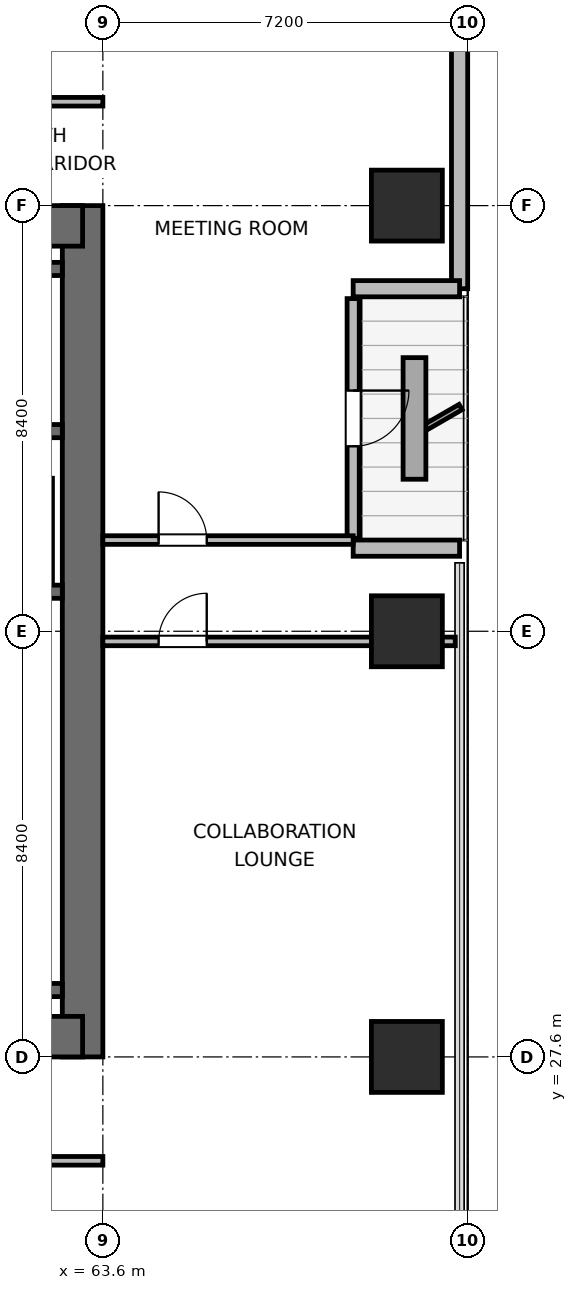
"""IFC4 building model, lengths in metres.
Left out: names, types, materials, properties, quantities, classifications, styles, units other than length and angle.
Written with IfcOpenShell. Run it as: python <this file> out.ifc"""

import sys

from ifc_helpers import new_model, si_unit, direction, frame, frame_2d, origin, origin_2d, place, context, subcontext, project, spatial, rectangle, extrude, element, fill, save


model = new_model("IFC4")
c1 = context("Model", 3, precision=1e-05, world=origin(), true_north=direction((0.0, 1.0)))
c2 = subcontext(c1, "Body", "Model", "MODEL_VIEW")
j1 = project(units=[si_unit("LENGTHUNIT", "METRE"), si_unit("PLANEANGLEUNIT", "RADIAN")], contexts=[c1])
p1 = place(None, origin())
s1 = spatial("IfcSite", under=j1, at=p1, CompositionType="ELEMENT")
p2 = place(p1, origin())
s2 = spatial("IfcBuilding", under=s1, at=p2, CompositionType="ELEMENT")
p3 = place(p2, frame((0.0, 0.0, 141.6)))
s3 = spatial("IfcBuildingStorey", under=s2, at=p3, CompositionType="ELEMENT", Elevation=141.6)
p4 = place(p3, frame((63.2, 27.6, 0.0), z_axis=(0.0, 0.0, 1.0), x_axis=(0.0, 1.0, 0.0)))
e1 = element("IfcWall", 1, at=p4, inside=s3, PredefinedType="SHEAR", context=c2, shape_type="SweptSolid", body=[
    extrude(rectangle(XDim=16.8, YDim=0.8, at=frame_2d((8.4, 0.0))), origin(), (0.0, 0.0, 1.0), 3.9),
])
p5 = place(p3, frame((54.0, 28.0, 0.0), z_axis=(0.0, 0.0, 1.0), x_axis=(1.0, 0.0, 0.0)))
e2 = element("IfcWall", 2, at=p5, inside=s3, PredefinedType="SHEAR", context=c2, shape_type="SweptSolid", body=[
    extrude(rectangle(XDim=9.2, YDim=0.8, at=frame_2d((4.6, 0.0))), origin(), (0.0, 0.0, 1.0), 3.9),
])
p6 = place(p5, frame((3.925, 0.0, 0.0)))
e3 = element("IfcOpeningElement", 3, at=p6, cuts=e2, PredefinedType="OPENING", context=c2, shape_type="SweptSolid", body=[
    extrude(rectangle(XDim=1.05, YDim=2.04, at=frame_2d((0.525, 1.02))), frame((0.0, 0.41, 0.0), z_axis=(0.0, -1.0, 0.0), x_axis=(1.0, 0.0, 0.0)), (0.0, 0.0, 1.0), 0.82),
])
p7 = place(p3, frame((54.0, 44.0, 0.0), z_axis=(0.0, 0.0, 1.0), x_axis=(1.0, 0.0, 0.0)))
e4 = element("IfcWall", 4, at=p7, inside=s3, PredefinedType="SHEAR", context=c2, shape_type="SweptSolid", body=[
    extrude(rectangle(XDim=9.2, YDim=0.8, at=frame_2d((4.6, 0.0))), origin(), (0.0, 0.0, 1.0), 3.9),
])
for number, where, z_axis, x_axis in (
    (5, (58.89, 28.92, 0.0), (0.0, 0.0, 1.0), (1.0, 0.0, 0.0)),
    (6, (58.89, 36.78, 0.0), (0.0, 0.0, 1.0), (1.0, 0.0, 0.0)),
):
    element("IfcWall", number, at=place(p3, frame(where, z_axis=z_axis, x_axis=x_axis)), inside=s3, PredefinedType="SHEAR", context=c2, shape_type="SweptSolid", body=[
        extrude(rectangle(XDim=3.91, YDim=0.26, at=frame_2d((1.955, 0.0))), origin(), (0.0, 0.0, 1.0), 3.9),
    ])
p8 = place(p3, frame((54.4, 39.95, 0.0), z_axis=(0.0, 0.0, 1.0), x_axis=(1.0, 0.0, 0.0)))
e7 = element("IfcWall", 7, at=p8, inside=s3, PredefinedType="SHEAR", context=c2, shape_type="SweptSolid", body=[
    extrude(rectangle(XDim=8.4, YDim=0.26, at=frame_2d((4.2, 0.0))), origin(), (0.0, 0.0, 1.0), 3.9),
])
p9 = place(p8, frame((0.8, 0.0, 0.0)))
e8 = element("IfcOpeningElement", 8, at=p9, cuts=e7, PredefinedType="OPENING", context=c2, shape_type="SweptSolid", body=[
    extrude(rectangle(XDim=1.0, YDim=2.04, at=frame_2d((0.5, 1.02))), frame((0.0, 0.14, 0.0), z_axis=(0.0, -1.0, 0.0), x_axis=(1.0, 0.0, 0.0)), (0.0, 0.0, 1.0), 0.28),
])
p10 = place(p3, frame((54.4, 43.15, 0.0), z_axis=(0.0, 0.0, 1.0), x_axis=(1.0, 0.0, 0.0)))
e9 = element("IfcWall", 9, at=p10, inside=s3, PredefinedType="SHEAR", context=c2, shape_type="SweptSolid", body=[
    extrude(rectangle(XDim=8.4, YDim=0.26, at=frame_2d((4.2, 0.0))), origin(), (0.0, 0.0, 1.0), 3.9),
])
for number, where, z_axis, x_axis in (
    (10, (69.6, 27.6, 0.0), (0.0, 0.0, 1.0), (1.0, 0.0, 0.0)),
    (11, (69.6, 36.0, 0.0), (0.0, 0.0, 1.0), (1.0, 0.0, 0.0)),
    (12, (69.6, 44.4, 0.0), (0.0, 0.0, 1.0), (1.0, 0.0, 0.0)),
):
    element("IfcColumn", number, at=place(p3, frame(where, z_axis=z_axis, x_axis=x_axis)), inside=s3, PredefinedType="COLUMN", context=c2, shape_type="SweptSolid", body=[
        extrude(rectangle(XDim=1.4, YDim=1.4, at=origin_2d()), origin(), (0.0, 0.0, 1.0), 3.9),
    ])
p11 = place(p3, frame((70.64, 56.979, 0.0), z_axis=(0.0, 0.0, 1.0), x_axis=(0.0, -1.0, 0.0)))
e13 = element("IfcWall", 13, at=p11, inside=s3, PredefinedType="SOLIDWALL", context=c2, shape_type="SweptSolid", body=[
    extrude(rectangle(XDim=14.219, YDim=0.32, at=frame_2d((7.109, 0.0))), origin(), (0.0, 0.0, 1.0), 3.6),
])
p12 = place(p3, frame((70.64, 42.76, 0.0), z_axis=(0.0, 0.0, 1.0), x_axis=(-1.0, 0.0, 0.0)))
e14 = element("IfcWall", 14, at=p12, inside=s3, PredefinedType="SOLIDWALL", context=c2, shape_type="SweptSolid", body=[
    extrude(rectangle(XDim=2.1, YDim=0.32, at=frame_2d((1.05, 0.0))), origin(), (0.0, 0.0, 1.0), 2.185),
])
p13 = place(p3, frame((68.54, 42.565, 0.0), z_axis=(0.0, 0.0, 1.0), x_axis=(0.0, -1.0, 0.0)))
e15 = element("IfcWall", 15, at=p13, inside=s3, PredefinedType="SOLIDWALL", context=c2, shape_type="SweptSolid", body=[
    extrude(rectangle(XDim=4.73, YDim=0.24, at=frame_2d((2.365, 0.0))), origin(), (0.0, 0.0, 1.0), 3.122),
])
p14 = place(p13, frame((1.815, 0.0, 0.0)))
e16 = element("IfcOpeningElement", 16, at=p14, cuts=e15, PredefinedType="OPENING", context=c2, shape_type="SweptSolid", body=[
    extrude(rectangle(XDim=1.1, YDim=2.04, at=frame_2d((0.55, 1.02))), frame((0.0, 0.13, 0.0), z_axis=(0.0, -1.0, 0.0), x_axis=(1.0, 0.0, 0.0)), (0.0, 0.0, 1.0), 0.26),
])
p15 = place(p3, frame((68.54, 37.64, 0.0), z_axis=(0.0, 0.0, 1.0), x_axis=(1.0, 0.0, 0.0)))
e17 = element("IfcWall", 17, at=p15, inside=s3, PredefinedType="SOLIDWALL", context=c2, shape_type="SweptSolid", body=[
    extrude(rectangle(XDim=2.1, YDim=0.32, at=frame_2d((1.05, 0.0))), origin(), (0.0, 0.0, 1.0), 2.185),
])
p16 = place(p3, frame((62.5, 36.98, 0.0), z_axis=(0.0, 0.0, 1.0), x_axis=(0.0, 1.0, 0.0)))
e18 = element("IfcWall", 18, at=p16, inside=s3, PredefinedType="PARTITIONING", context=c2, shape_type="SweptSolid", body=[
    extrude(rectangle(XDim=2.04, YDim=0.21, at=frame_2d((1.02, 0.0))), origin(), (0.0, 0.0, 1.0), 3.6),
])
p17 = place(p3, frame((30.35, 25.55, 0.0), z_axis=(0.0, 0.0, 1.0), x_axis=(1.0, 0.0, 0.0)))
e19 = element("IfcWall", 19, at=p17, inside=s3, PredefinedType="PARTITIONING", context=c2, shape_type="SweptSolid", body=[
    extrude(rectangle(XDim=33.25, YDim=0.17, at=frame_2d((16.625, 0.0))), origin(), (0.0, 0.0, 1.0), 3.6),
])
p18 = place(p17, frame((3.21, 0.0, 0.0)))
e20 = element("IfcOpeningElement", 20, at=p18, cuts=e19, PredefinedType="OPENING", context=c2, shape_type="SweptSolid", body=[
    extrude(rectangle(XDim=0.95, YDim=2.04, at=frame_2d((0.475, 1.02))), frame((0.0, 0.095, 0.0), z_axis=(0.0, -1.0, 0.0), x_axis=(1.0, 0.0, 0.0)), (0.0, 0.0, 1.0), 0.19),
])
p19 = place(p17, frame((9.98, 0.0, 0.0)))
e21 = element("IfcOpeningElement", 21, at=p19, cuts=e19, PredefinedType="OPENING", context=c2, shape_type="SweptSolid", body=[
    extrude(rectangle(XDim=0.95, YDim=2.04, at=frame_2d((0.475, 1.02))), frame((0.0, 0.095, 0.0), z_axis=(0.0, -1.0, 0.0), x_axis=(1.0, 0.0, 0.0)), (0.0, 0.0, 1.0), 0.19),
])
p20 = place(p17, frame((16.15, 0.0, 0.0)))
e22 = element("IfcOpeningElement", 22, at=p20, cuts=e19, PredefinedType="OPENING", context=c2, shape_type="SweptSolid", body=[
    extrude(rectangle(XDim=0.95, YDim=2.04, at=frame_2d((0.475, 1.02))), frame((0.0, 0.095, 0.0), z_axis=(0.0, -1.0, 0.0), x_axis=(1.0, 0.0, 0.0)), (0.0, 0.0, 1.0), 0.19),
])
p21 = place(p17, frame((22.32, 0.0, 0.0)))
e23 = element("IfcOpeningElement", 23, at=p21, cuts=e19, PredefinedType="OPENING", context=c2, shape_type="SweptSolid", body=[
    extrude(rectangle(XDim=0.95, YDim=2.04, at=frame_2d((0.475, 1.02))), frame((0.0, 0.095, 0.0), z_axis=(0.0, -1.0, 0.0), x_axis=(1.0, 0.0, 0.0)), (0.0, 0.0, 1.0), 0.19),
])
p22 = place(p17, frame((29.09, 0.0, 0.0)))
e24 = element("IfcOpeningElement", 24, at=p22, cuts=e19, PredefinedType="OPENING", context=c2, shape_type="SweptSolid", body=[
    extrude(rectangle(XDim=0.95, YDim=2.04, at=frame_2d((0.475, 1.02))), frame((0.0, 0.095, 0.0), z_axis=(0.0, -1.0, 0.0), x_axis=(1.0, 0.0, 0.0)), (0.0, 0.0, 1.0), 0.19),
])
p23 = place(p3, frame((30.35, 46.45, 0.0), z_axis=(0.0, 0.0, 1.0), x_axis=(1.0, 0.0, 0.0)))
e25 = element("IfcWall", 25, at=p23, inside=s3, PredefinedType="PARTITIONING", context=c2, shape_type="SweptSolid", body=[
    extrude(rectangle(XDim=33.25, YDim=0.17, at=frame_2d((16.625, 0.0))), origin(), (0.0, 0.0, 1.0), 3.6),
])
p24 = place(p23, frame((3.03, 0.0, 0.0)))
e26 = element("IfcOpeningElement", 26, at=p24, cuts=e25, PredefinedType="OPENING", context=c2, shape_type="SweptSolid", body=[
    extrude(rectangle(XDim=0.95, YDim=2.04, at=frame_2d((0.475, 1.02))), frame((0.0, 0.095, 0.0), z_axis=(0.0, -1.0, 0.0), x_axis=(1.0, 0.0, 0.0)), (0.0, 0.0, 1.0), 0.19),
])
p25 = place(p23, frame((10.09, 0.0, 0.0)))
e27 = element("IfcOpeningElement", 27, at=p25, cuts=e25, PredefinedType="OPENING", context=c2, shape_type="SweptSolid", body=[
    extrude(rectangle(XDim=0.95, YDim=2.04, at=frame_2d((0.475, 1.02))), frame((0.0, 0.095, 0.0), z_axis=(0.0, -1.0, 0.0), x_axis=(1.0, 0.0, 0.0)), (0.0, 0.0, 1.0), 0.19),
])
p26 = place(p23, frame((15.1, 0.0, 0.0)))
e28 = element("IfcOpeningElement", 28, at=p26, cuts=e25, PredefinedType="OPENING", context=c2, shape_type="SweptSolid", body=[
    extrude(rectangle(XDim=0.95, YDim=2.04, at=frame_2d((0.475, 1.02))), frame((0.0, 0.095, 0.0), z_axis=(0.0, -1.0, 0.0), x_axis=(1.0, 0.0, 0.0)), (0.0, 0.0, 1.0), 0.19),
])
p27 = place(p23, frame((21.16, 0.0, 0.0)))
e29 = element("IfcOpeningElement", 29, at=p27, cuts=e25, PredefinedType="OPENING", context=c2, shape_type="SweptSolid", body=[
    extrude(rectangle(XDim=0.95, YDim=2.04, at=frame_2d((0.475, 1.02))), frame((0.0, 0.095, 0.0), z_axis=(0.0, -1.0, 0.0), x_axis=(1.0, 0.0, 0.0)), (0.0, 0.0, 1.0), 0.19),
])
p28 = place(p23, frame((29.27, 0.0, 0.0)))
e30 = element("IfcOpeningElement", 30, at=p28, cuts=e25, PredefinedType="OPENING", context=c2, shape_type="SweptSolid", body=[
    extrude(rectangle(XDim=0.95, YDim=2.04, at=frame_2d((0.475, 1.02))), frame((0.0, 0.095, 0.0), z_axis=(0.0, -1.0, 0.0), x_axis=(1.0, 0.0, 0.0)), (0.0, 0.0, 1.0), 0.19),
])
p29 = place(p3, frame((63.6, 35.8, 0.0), z_axis=(0.0, 0.0, 1.0), x_axis=(1.0, 0.0, 0.0)))
e31 = element("IfcWall", 31, at=p29, inside=s3, PredefinedType="PARTITIONING", context=c2, shape_type="SweptSolid", body=[
    extrude(rectangle(XDim=6.955, YDim=0.17, at=frame_2d((3.478, 0.0))), origin(), (0.0, 0.0, 1.0), 2.135),
])
p30 = place(p29, frame((1.1, 0.0, 0.0)))
e32 = element("IfcOpeningElement", 32, at=p30, cuts=e31, PredefinedType="OPENING", context=c2, shape_type="SweptSolid", body=[
    extrude(rectangle(XDim=0.95, YDim=2.04, at=frame_2d((0.475, 1.02))), frame((0.0, 0.095, 0.0), z_axis=(0.0, -1.0, 0.0), x_axis=(1.0, 0.0, 0.0)), (0.0, 0.0, 1.0), 0.19),
])
p31 = place(p3, frame((63.6, 37.8, 0.0), z_axis=(0.0, 0.0, 1.0), x_axis=(1.0, 0.0, 0.0)))
e33 = element("IfcWall", 33, at=p31, inside=s3, PredefinedType="PARTITIONING", context=c2, shape_type="SweptSolid", body=[
    extrude(rectangle(XDim=4.94, YDim=0.17, at=frame_2d((2.47, 0.0))), origin(), (0.0, 0.0, 1.0), 3.6),
])
p32 = place(p31, frame((1.1, 0.0, 0.0)))
e34 = element("IfcOpeningElement", 34, at=p32, cuts=e33, PredefinedType="OPENING", context=c2, shape_type="SweptSolid", body=[
    extrude(rectangle(XDim=0.95, YDim=2.04, at=frame_2d((0.475, 1.02))), frame((0.0, 0.095, 0.0), z_axis=(0.0, -1.0, 0.0), x_axis=(1.0, 0.0, 0.0)), (0.0, 0.0, 1.0), 0.19),
])
p33 = place(p14, origin())
e35 = element("IfcDoor", 35, at=p33, inside=s3, OperationType="SINGLE_SWING_LEFT", PredefinedType="DOOR", context=c2, shape_type="SweptSolid", body=[
    extrude(rectangle(XDim=1.1, YDim=2.04, at=frame_2d((0.55, 1.02))), frame((0.0, 0.025, 0.0), z_axis=(0.0, -1.0, 0.0), x_axis=(1.0, 0.0, 0.0)), (0.0, 0.0, 1.0), 0.05),
])
fill(e16, e35)
p34 = place(p30, origin())
e36 = element("IfcDoor", 36, at=p34, inside=s3, OperationType="SINGLE_SWING_RIGHT", PredefinedType="DOOR", context=c2, shape_type="SweptSolid", body=[
    extrude(rectangle(XDim=0.95, YDim=2.04, at=frame_2d((0.475, 1.02))), frame((0.0, 0.025, 0.0), z_axis=(0.0, -1.0, 0.0), x_axis=(1.0, 0.0, 0.0)), (0.0, 0.0, 1.0), 0.05),
])
fill(e32, e36)
p35 = place(p32, origin())
e37 = element("IfcDoor", 37, at=p35, inside=s3, OperationType="SINGLE_SWING_LEFT", PredefinedType="DOOR", context=c2, shape_type="SweptSolid", body=[
    extrude(rectangle(XDim=0.95, YDim=2.04, at=frame_2d((0.475, 1.02))), frame((0.0, 0.025, 0.0), z_axis=(0.0, -1.0, 0.0), x_axis=(1.0, 0.0, 0.0)), (0.0, 0.0, 1.0), 0.05),
])
fill(e34, e37)
save(model, sys.argv[1])
